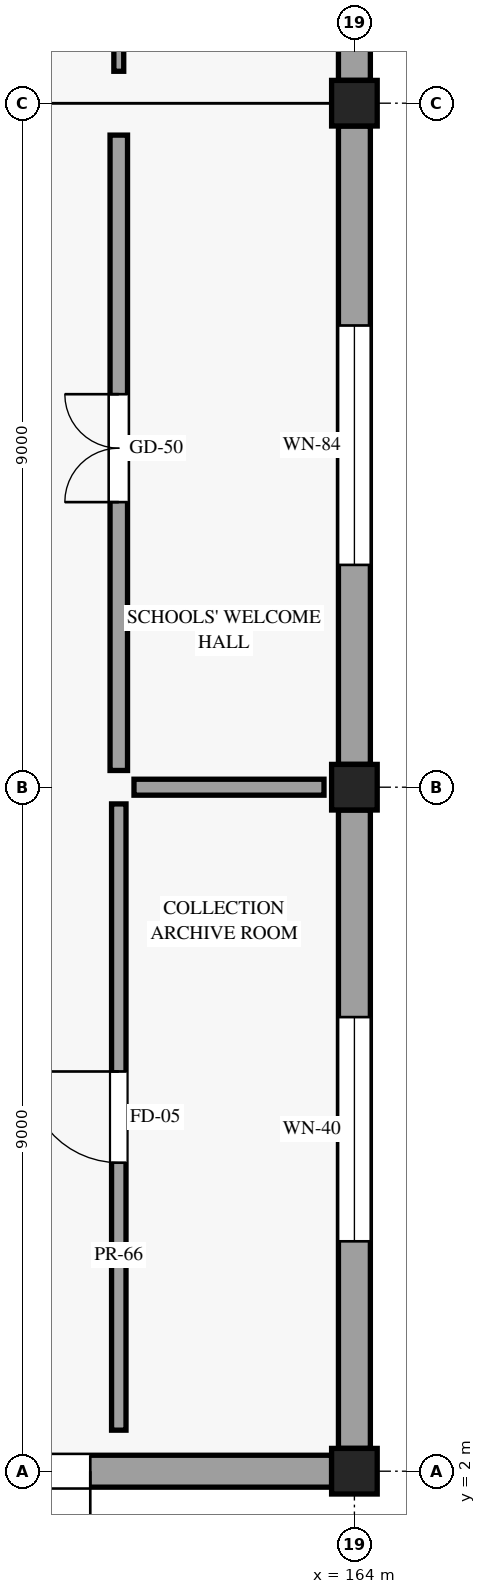
"""IFC4 building model, lengths in metres.
Left out: names, types, materials, properties, quantities, classifications, styles, units other than length and angle.
Written with IfcOpenShell. Run it as: python <this file> out.ifc"""

import sys

from ifc_helpers import new_model, si_unit, direction, frame, frame_2d, origin, origin_2d, place, context, subcontext, project, spatial, rectangle, extrude, element, fill, save


model = new_model("IFC4")
c1 = context("Model", 3, precision=1e-05, world=origin(), true_north=direction((0.0, 1.0)))
c2 = subcontext(c1, "Body", "Model", "MODEL_VIEW")
j1 = project(units=[si_unit("LENGTHUNIT", "METRE"), si_unit("PLANEANGLEUNIT", "RADIAN")], contexts=[c1])
p1 = place(None, origin())
s1 = spatial("IfcSite", under=j1, at=p1, CompositionType="ELEMENT")
p2 = place(p1, origin())
s2 = spatial("IfcBuilding", under=s1, at=p2, CompositionType="ELEMENT")
p3 = place(p2, origin())
s3 = spatial("IfcBuildingStorey", under=s2, at=p3, CompositionType="ELEMENT", Elevation=0.0)
for number, where, z_axis, x_axis in (
    (1, (164.0, 2.0, 0.0), (0.0, 0.0, 1.0), (1.0, 0.0, 0.0)),
    (2, (164.0, 11.0, 0.0), (0.0, 0.0, 1.0), (1.0, 0.0, 0.0)),
    (3, (164.0, 20.0, 0.0), (0.0, 0.0, 1.0), (1.0, 0.0, 0.0)),
):
    element("IfcColumn", number, at=place(p3, frame(where, z_axis=z_axis, x_axis=x_axis)), inside=s3, PredefinedType="COLUMN", context=c2, shape_type="SweptSolid", body=[
        extrude(rectangle(XDim=0.6, YDim=0.6, at=origin_2d()), origin(), (0.0, 0.0, 1.0), 5.4),
    ])
p4 = place(p3, frame((155.3, 2.0, 0.0), z_axis=(0.0, 0.0, 1.0), x_axis=(1.0, 0.0, 0.0)))
e4 = element("IfcWall", 4, at=p4, inside=s3, PredefinedType="STANDARD", context=c2, shape_type="SweptSolid", body=[
    extrude(rectangle(XDim=8.4, YDim=0.42, at=frame_2d((4.2, 0.0))), origin(), (0.0, 0.0, 1.0), 4.555),
])
p5 = place(p4, frame((5.225, 0.0, 0.0), z_axis=(0.0, 0.0, 1.0), x_axis=(-1.0, 0.0, 0.0)))
e5 = element("IfcOpeningElement", 5, at=p5, cuts=e4, PredefinedType="OPENING", context=c2, shape_type="SweptSolid", body=[
    extrude(rectangle(XDim=2.05, YDim=2.45, at=frame_2d((1.025, 1.225))), frame((0.0, 0.22, 0.0), z_axis=(0.0, -1.0, 0.0), x_axis=(1.0, 0.0, 0.0)), (0.0, 0.0, 1.0), 0.44),
])
p6 = place(p3, frame((164.0, 2.3, 0.0), z_axis=(0.0, 0.0, 1.0), x_axis=(0.0, 1.0, 0.0)))
e6 = element("IfcWall", 6, at=p6, inside=s3, PredefinedType="STANDARD", context=c2, shape_type="SweptSolid", body=[
    extrude(rectangle(XDim=8.4, YDim=0.42, at=frame_2d((4.2, 0.0))), origin(), (0.0, 0.0, 1.0), 4.555),
])
p7 = place(p6, frame((5.675, 0.0, 0.85), z_axis=(0.0, 0.0, 1.0), x_axis=(-1.0, 0.0, 0.0)))
e7 = element("IfcOpeningElement", 7, at=p7, cuts=e6, PredefinedType="OPENING", context=c2, shape_type="SweptSolid", body=[
    extrude(rectangle(XDim=2.95, YDim=2.5, at=frame_2d((1.475, 1.25))), frame((0.0, 0.22, 0.0), z_axis=(0.0, -1.0, 0.0), x_axis=(1.0, 0.0, 0.0)), (0.0, 0.0, 1.0), 0.44),
])
p8 = place(p3, frame((164.0, 11.3, 0.0), z_axis=(0.0, 0.0, 1.0), x_axis=(0.0, 1.0, 0.0)))
e8 = element("IfcWall", 8, at=p8, inside=s3, PredefinedType="STANDARD", context=c2, shape_type="SweptSolid", body=[
    extrude(rectangle(XDim=8.4, YDim=0.42, at=frame_2d((4.2, 0.0))), origin(), (0.0, 0.0, 1.0), 4.555),
])
p9 = place(p8, frame((5.775, 0.0, 0.85), z_axis=(0.0, 0.0, 1.0), x_axis=(-1.0, 0.0, 0.0)))
e9 = element("IfcOpeningElement", 9, at=p9, cuts=e8, PredefinedType="OPENING", context=c2, shape_type="SweptSolid", body=[
    extrude(rectangle(XDim=3.15, YDim=2.55, at=frame_2d((1.575, 1.275))), frame((0.0, 0.22, 0.0), z_axis=(0.0, -1.0, 0.0), x_axis=(1.0, 0.0, 0.0)), (0.0, 0.0, 1.0), 0.44),
])
p10 = place(p3, frame((164.0, 20.3, 0.0), z_axis=(0.0, 0.0, 1.0), x_axis=(0.0, 1.0, 0.0)))
e10 = element("IfcWall", 10, at=p10, inside=s3, PredefinedType="STANDARD", context=c2, shape_type="SweptSolid", body=[
    extrude(rectangle(XDim=8.6, YDim=0.42, at=frame_2d((4.3, 0.0))), origin(), (0.0, 0.0, 1.0), 4.555),
])
p11 = place(p10, frame((5.25, 0.0, 0.85), z_axis=(0.0, 0.0, 1.0), x_axis=(-1.0, 0.0, 0.0)))
e11 = element("IfcOpeningElement", 11, at=p11, cuts=e10, PredefinedType="OPENING", context=c2, shape_type="SweptSolid", body=[
    extrude(rectangle(XDim=1.9, YDim=2.4, at=frame_2d((0.95, 1.2))), frame((0.0, 0.22, 0.0), z_axis=(0.0, -1.0, 0.0), x_axis=(1.0, 0.0, 0.0)), (0.0, 0.0, 1.0), 0.44),
])
p12 = place(p3, frame((160.9, 2.54, 0.0), z_axis=(0.0, 0.0, 1.0), x_axis=(0.0, 1.0, 0.0)))
e12 = element("IfcWall", 12, at=p12, inside=s3, PredefinedType="PARTITIONING", context=c2, shape_type="SweptSolid", body=[
    extrude(rectangle(XDim=8.24, YDim=0.19, at=frame_2d((4.12, 0.0))), origin(), (0.0, 0.0, 1.0), 4.555),
])
p13 = place(p12, frame((3.519, 0.0, 0.0)))
e13 = element("IfcOpeningElement", 13, at=p13, cuts=e12, PredefinedType="OPENING", context=c2, shape_type="SweptSolid", body=[
    extrude(rectangle(XDim=1.2, YDim=2.3, at=frame_2d((0.6, 1.15))), frame((0.0, 0.105, 0.0), z_axis=(0.0, -1.0, 0.0), x_axis=(1.0, 0.0, 0.0)), (0.0, 0.0, 1.0), 0.21),
])
p14 = place(p3, frame((161.1, 11.0, 0.0), z_axis=(0.0, 0.0, 1.0), x_axis=(1.0, 0.0, 0.0)))
e14 = element("IfcWall", 14, at=p14, inside=s3, PredefinedType="PARTITIONING", context=c2, shape_type="SweptSolid", body=[
    extrude(rectangle(XDim=2.5, YDim=0.21, at=frame_2d((1.25, 0.0))), origin(), (0.0, 0.0, 1.0), 4.555),
])
p15 = place(p3, frame((160.9, 11.22, 0.0), z_axis=(0.0, 0.0, 1.0), x_axis=(0.0, 1.0, 0.0)))
e15 = element("IfcWall", 15, at=p15, inside=s3, PredefinedType="PARTITIONING", context=c2, shape_type="SweptSolid", body=[
    extrude(rectangle(XDim=8.36, YDim=0.23, at=frame_2d((4.18, 0.0))), origin(), (0.0, 0.0, 1.0), 4.555),
])
p16 = place(p15, frame((3.531, 0.0, 0.0)))
e16 = element("IfcOpeningElement", 16, at=p16, cuts=e15, PredefinedType="OPENING", context=c2, shape_type="SweptSolid", body=[
    extrude(rectangle(XDim=1.42, YDim=2.3, at=frame_2d((0.71, 1.15))), frame((0.0, 0.125, 0.0), z_axis=(0.0, -1.0, 0.0), x_axis=(1.0, 0.0, 0.0)), (0.0, 0.0, 1.0), 0.25),
])
p17 = place(p3, frame((160.9, 20.42, 0.0), z_axis=(0.0, 0.0, 1.0), x_axis=(0.0, 1.0, 0.0)))
e17 = element("IfcWall", 17, at=p17, inside=s3, PredefinedType="PARTITIONING", context=c2, shape_type="SweptSolid", body=[
    extrude(rectangle(XDim=17.76, YDim=0.13, at=frame_2d((8.88, 0.0))), origin(), (0.0, 0.0, 1.0), 4.555),
])
p18 = place(p17, frame((3.734, 0.0, 0.0)))
e18 = element("IfcOpeningElement", 18, at=p18, cuts=e17, PredefinedType="OPENING", context=c2, shape_type="SweptSolid", body=[
    extrude(rectangle(XDim=0.95, YDim=2.15, at=frame_2d((0.475, 1.075))), frame((0.0, 0.075, 0.0), z_axis=(0.0, -1.0, 0.0), x_axis=(1.0, 0.0, 0.0)), (0.0, 0.0, 1.0), 0.15),
])
p19 = place(p5, origin())
e19 = element("IfcDoor", 19, at=p19, inside=s3, OperationType="DOUBLE_DOOR_SINGLE_SWING", PredefinedType="DOOR", context=c2, shape_type="SweptSolid", body=[
    extrude(rectangle(XDim=2.05, YDim=2.45, at=frame_2d((1.025, 1.225))), frame((0.0, 0.025, 0.0), z_axis=(0.0, -1.0, 0.0), x_axis=(1.0, 0.0, 0.0)), (0.0, 0.0, 1.0), 0.05),
])
fill(e5, e19)
p20 = place(p7, origin())
e20 = element("IfcWindow", 20, at=p20, inside=s3, PartitioningType="SINGLE_PANEL", PredefinedType="WINDOW", context=c2, shape_type="SweptSolid", body=[
    extrude(rectangle(XDim=2.95, YDim=2.5, at=frame_2d((1.475, 1.25))), frame((0.0, 0.03, 0.0), z_axis=(0.0, -1.0, 0.0), x_axis=(1.0, 0.0, 0.0)), (0.0, 0.0, 1.0), 0.06),
])
fill(e7, e20)
p21 = place(p9, origin())
e21 = element("IfcWindow", 21, at=p21, inside=s3, PartitioningType="SINGLE_PANEL", PredefinedType="WINDOW", context=c2, shape_type="SweptSolid", body=[
    extrude(rectangle(XDim=3.15, YDim=2.55, at=frame_2d((1.575, 1.275))), frame((0.0, 0.03, 0.0), z_axis=(0.0, -1.0, 0.0), x_axis=(1.0, 0.0, 0.0)), (0.0, 0.0, 1.0), 0.06),
])
fill(e9, e21)
p22 = place(p13, origin())
e22 = element("IfcDoor", 22, at=p22, inside=s3, OperationType="SINGLE_SWING_RIGHT", PredefinedType="DOOR", context=c2, shape_type="SweptSolid", body=[
    extrude(rectangle(XDim=1.2, YDim=2.3, at=frame_2d((0.6, 1.15))), frame((0.0, 0.025, 0.0), z_axis=(0.0, -1.0, 0.0), x_axis=(1.0, 0.0, 0.0)), (0.0, 0.0, 1.0), 0.05),
])
fill(e13, e22)
p23 = place(p16, origin())
e23 = element("IfcDoor", 23, at=p23, inside=s3, OperationType="DOUBLE_DOOR_SINGLE_SWING", PredefinedType="DOOR", context=c2, shape_type="SweptSolid", body=[
    extrude(rectangle(XDim=1.42, YDim=2.3, at=frame_2d((0.71, 1.15))), frame((0.0, 0.025, 0.0), z_axis=(0.0, -1.0, 0.0), x_axis=(1.0, 0.0, 0.0)), (0.0, 0.0, 1.0), 0.05),
])
fill(e16, e23)
save(model, sys.argv[1])
